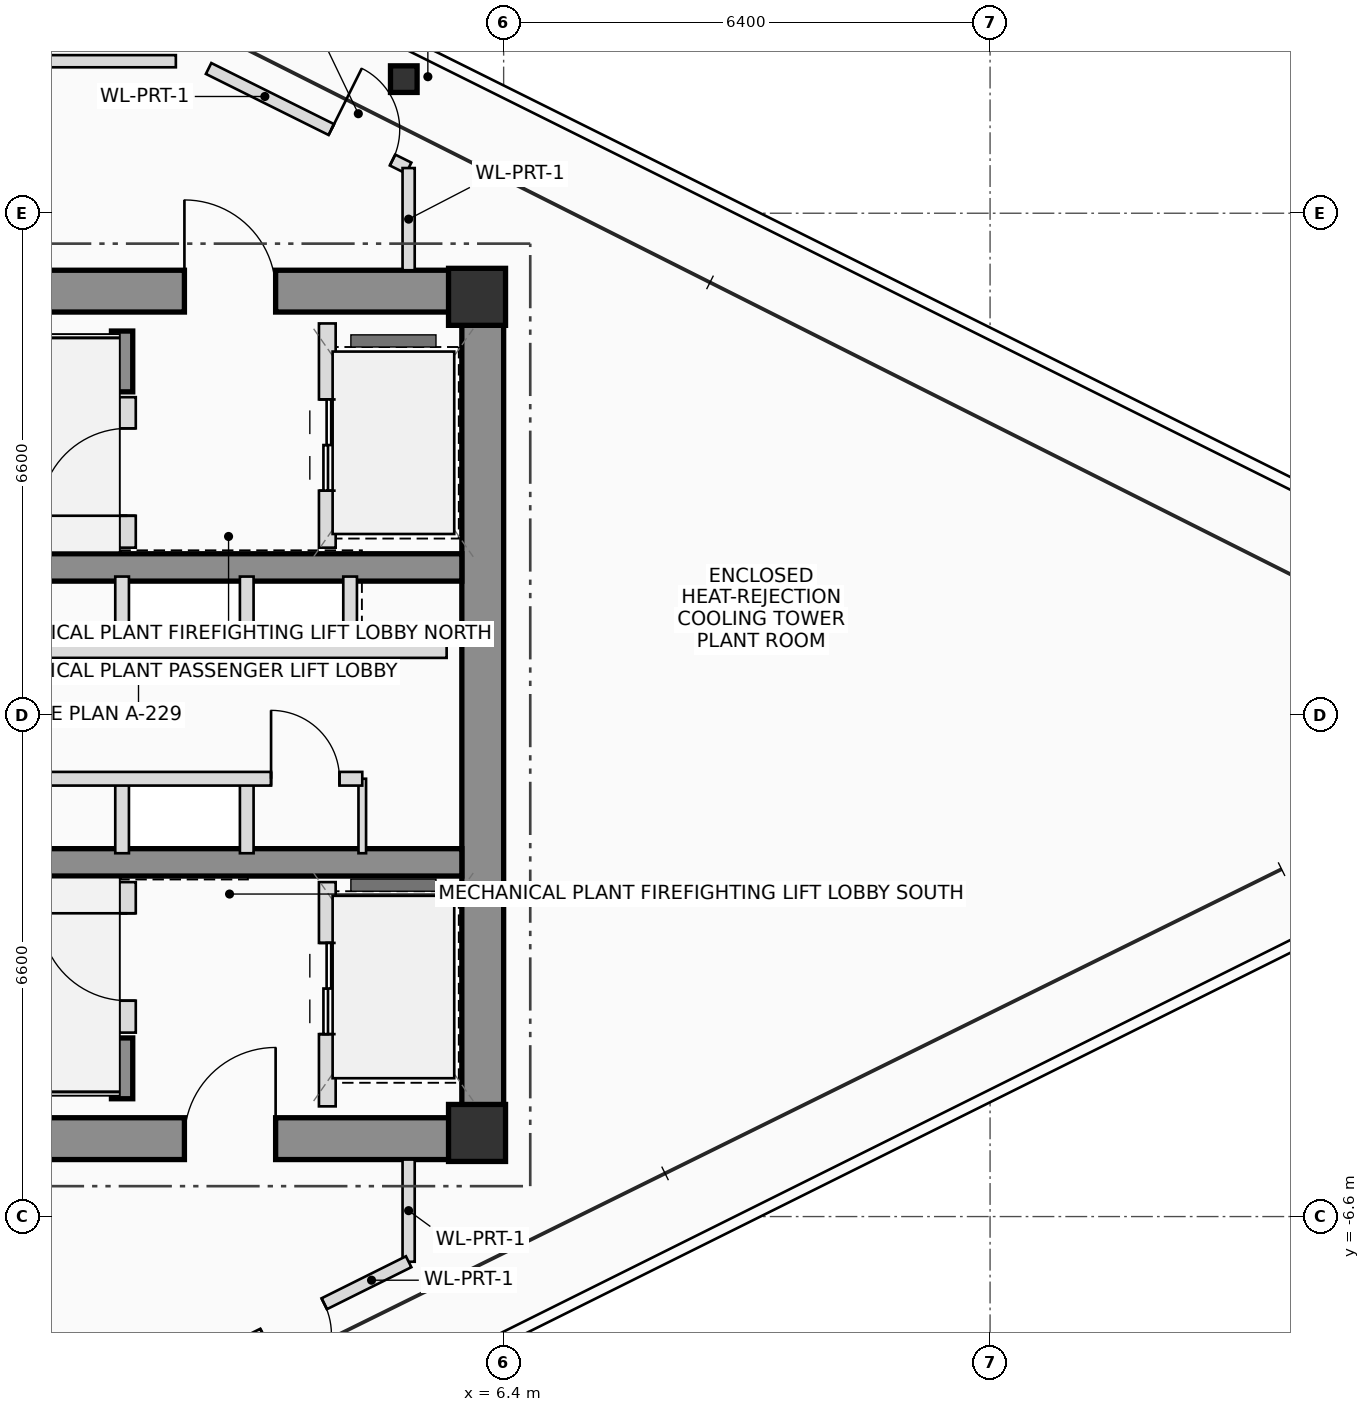
"""IFC4 building model, lengths in metres.
Left out: names, types, materials, properties, quantities, classifications, styles, units other than length and angle.
Written with IfcOpenShell. Run it as: python <this file> out.ifc"""

import sys

from ifc_helpers import new_model, si_unit, direction, frame, frame_2d, origin, origin_2d, place, context, subcontext, project, spatial, rectangle, i_section, extrude, source, transform, mapped, element, fill, save


model = new_model("IFC4")
c1 = context("Model", 3, precision=1e-05, world=origin(), true_north=direction((0.0, 1.0)))
c2 = subcontext(c1, "Body", "Model", "MODEL_VIEW")
j1 = project(units=[si_unit("LENGTHUNIT", "METRE"), si_unit("PLANEANGLEUNIT", "RADIAN")], contexts=[c1])
p1 = place(None, origin())
s1 = spatial("IfcSite", under=j1, at=p1, CompositionType="ELEMENT")
p2 = place(p1, origin())
s2 = spatial("IfcBuilding", under=s1, at=p2, CompositionType="ELEMENT")
p3 = place(p2, frame((0.0, 0.0, 317.45)))
s3 = spatial("IfcBuildingStorey", under=s2, at=p3, CompositionType="ELEMENT", Elevation=317.45)
m1 = source(origin(), c2, "Body", "SweptSolid", [
    extrude(rectangle(XDim=0.75, YDim=0.75, at=origin_2d()), origin(), (0.0, 0.0, 1.0), 5.4),
])
for number, where, z_axis, x_axis in (
    (1, (6.05, -5.5, 0.0), (0.0, 0.0, 1.0), (1.0, 0.0, 0.0)),
    (2, (6.05, 5.5, 0.0), (0.0, 0.0, 1.0), (1.0, 0.0, 0.0)),
):
    element("IfcColumn", number, at=place(p3, frame(where, z_axis=z_axis, x_axis=x_axis)), inside=s3, PredefinedType="COLUMN", context=c2, shape_type="MappedRepresentation", body=[
        mapped(m1, transform((0.0, 0.0, 0.0), scale=1.0)),
    ])
p4 = place(p3, frame((-6.4, 5.575, 0.0), z_axis=(0.0, 0.0, 1.0), x_axis=(1.0, 0.0, 0.0)))
e3 = element("IfcWall", 3, at=p4, inside=s3, PredefinedType="SHEAR", context=c2, shape_type="SweptSolid", body=[
    extrude(rectangle(XDim=12.8, YDim=0.55, at=frame_2d((6.4, 0.0))), origin(), (0.0, 0.0, 1.0), 5.4),
])
p5 = place(p4, frame((8.6, 0.0, 0.0)))
e4 = element("IfcOpeningElement", 4, at=p5, cuts=e3, PredefinedType="OPENING", context=c2, shape_type="SweptSolid", body=[
    extrude(rectangle(XDim=1.2, YDim=2.2, at=frame_2d((0.6, 1.1))), frame((0.0, 0.285, 0.0), z_axis=(0.0, -1.0, 0.0), x_axis=(1.0, 0.0, 0.0)), (0.0, 0.0, 1.0), 0.57),
])
p6 = place(p3, frame((-6.4, -5.575, 0.0), z_axis=(0.0, 0.0, 1.0), x_axis=(1.0, 0.0, 0.0)))
e5 = element("IfcWall", 5, at=p6, inside=s3, PredefinedType="SHEAR", context=c2, shape_type="SweptSolid", body=[
    extrude(rectangle(XDim=12.8, YDim=0.55, at=frame_2d((6.4, 0.0))), origin(), (0.0, 0.0, 1.0), 5.4),
])
p7 = place(p6, frame((8.6, 0.0, 0.0)))
e6 = element("IfcOpeningElement", 6, at=p7, cuts=e5, PredefinedType="OPENING", context=c2, shape_type="SweptSolid", body=[
    extrude(rectangle(XDim=1.2, YDim=2.2, at=frame_2d((0.6, 1.1))), frame((0.0, 0.285, 0.0), z_axis=(0.0, -1.0, 0.0), x_axis=(1.0, 0.0, 0.0)), (0.0, 0.0, 1.0), 0.57),
])
p8 = place(p3, frame((6.125, -5.3, 0.0), z_axis=(0.0, 0.0, 1.0), x_axis=(0.0, 1.0, 0.0)))
e7 = element("IfcWall", 7, at=p8, inside=s3, PredefinedType="SHEAR", context=c2, shape_type="SweptSolid", body=[
    extrude(rectangle(XDim=10.6, YDim=0.55, at=frame_2d((5.3, 0.0))), origin(), (0.0, 0.0, 1.0), 5.4),
])
for number, where, z_axis, x_axis in (
    (8, (-5.85, 1.94, 0.0), (0.0, 0.0, 1.0), (1.0, 0.0, 0.0)),
    (9, (-5.85, -1.94, 0.0), (0.0, 0.0, 1.0), (1.0, 0.0, 0.0)),
):
    element("IfcWall", number, at=place(p3, frame(where, z_axis=z_axis, x_axis=x_axis)), inside=s3, PredefinedType="SHEAR", context=c2, shape_type="SweptSolid", body=[
        extrude(rectangle(XDim=11.7, YDim=0.36, at=frame_2d((5.85, 0.0))), origin(), (0.0, 0.0, 1.0), 5.4),
    ])
for number, where, z_axis, x_axis in (
    (10, (1.38, 4.25, 0.0), (0.0, 0.0, 1.0), (0.0, 1.0, 0.0)),
    (11, (1.38, -5.05, 0.0), (0.0, 0.0, 1.0), (0.0, 1.0, 0.0)),
):
    element("IfcWall", number, at=place(p3, frame(where, z_axis=z_axis, x_axis=x_axis)), inside=s3, PredefinedType="SHEAR", context=c2, shape_type="SweptSolid", body=[
        extrude(rectangle(XDim=0.8, YDim=0.28, at=frame_2d((0.4, 0.0))), origin(), (0.0, 0.0, 1.0), 5.4),
    ])
m2 = source(origin(), c2, "Body", "SweptSolid", [
    extrude(i_section(OverallWidth=0.35, OverallDepth=0.35, WebThickness=0.012, FlangeThickness=0.019, FilletRadius=0.016, at=origin_2d()), origin(), (0.0, 0.0, 1.0), 5.4),
])
p9 = place(p3, frame((5.086, 8.364, 0.0), z_axis=(0.0, 0.0, 1.0), x_axis=(1.0, 0.0, 0.0)))
e12 = element("IfcColumn", 12, at=p9, inside=s3, PredefinedType="COLUMN", context=c2, shape_type="MappedRepresentation", body=[
    mapped(m2, transform((0.0, 0.0, 0.0), scale=1.0)),
])
p10 = place(p3, frame((1.45, 2.2, 0.0), z_axis=(0.0, 0.0, 1.0), x_axis=(0.0, 1.0, 0.0)))
e13 = element("IfcWall", 13, at=p10, inside=s3, PredefinedType="PLUMBINGWALL", context=c2, shape_type="SweptSolid", body=[
    extrude(rectangle(XDim=1.98, YDim=0.22, at=frame_2d((0.99, 0.0))), origin(), (0.0, 0.0, 1.0), 5.12),
])
p11 = place(p10, frame((0.42, 0.0, 0.0)))
e14 = element("IfcOpeningElement", 14, at=p11, cuts=e13, PredefinedType="OPENING", context=c2, shape_type="SweptSolid", body=[
    extrude(rectangle(XDim=1.15, YDim=2.15, at=frame_2d((0.575, 1.075))), frame((0.0, 0.12, 0.0), z_axis=(0.0, -1.0, 0.0), x_axis=(1.0, 0.0, 0.0)), (0.0, 0.0, 1.0), 0.24),
])
p12 = place(p3, frame((4.08, 2.2, 0.0), z_axis=(0.0, 0.0, 1.0), x_axis=(0.0, 1.0, 0.0)))
e15 = element("IfcWall", 15, at=p12, inside=s3, PredefinedType="PLUMBINGWALL", context=c2, shape_type="SweptSolid", body=[
    extrude(rectangle(XDim=2.95, YDim=0.22, at=frame_2d((1.475, 0.0))), origin(), (0.0, 0.0, 1.0), 5.12),
])
p13 = place(p12, frame((0.75, 0.0, 0.0)))
e16 = element("IfcOpeningElement", 16, at=p13, cuts=e15, PredefinedType="OPENING", context=c2, shape_type="SweptSolid", body=[
    extrude(rectangle(XDim=1.2, YDim=2.25, at=frame_2d((0.6, 1.125))), frame((0.0, 0.12, 0.0), z_axis=(0.0, -1.0, 0.0), x_axis=(1.0, 0.0, 0.0)), (0.0, 0.0, 1.0), 0.24),
])
p14 = place(p3, frame((1.45, -4.18, 0.0), z_axis=(0.0, 0.0, 1.0), x_axis=(0.0, 1.0, 0.0)))
e17 = element("IfcWall", 17, at=p14, inside=s3, PredefinedType="PLUMBINGWALL", context=c2, shape_type="SweptSolid", body=[
    extrude(rectangle(XDim=1.98, YDim=0.22, at=frame_2d((0.99, 0.0))), origin(), (0.0, 0.0, 1.0), 5.12),
])
p15 = place(p14, frame((0.42, 0.0, 0.0)))
e18 = element("IfcOpeningElement", 18, at=p15, cuts=e17, PredefinedType="OPENING", context=c2, shape_type="SweptSolid", body=[
    extrude(rectangle(XDim=1.15, YDim=2.15, at=frame_2d((0.575, 1.075))), frame((0.0, 0.12, 0.0), z_axis=(0.0, -1.0, 0.0), x_axis=(1.0, 0.0, 0.0)), (0.0, 0.0, 1.0), 0.24),
])
p16 = place(p3, frame((4.08, -5.15, 0.0), z_axis=(0.0, 0.0, 1.0), x_axis=(0.0, 1.0, 0.0)))
e19 = element("IfcWall", 19, at=p16, inside=s3, PredefinedType="PLUMBINGWALL", context=c2, shape_type="SweptSolid", body=[
    extrude(rectangle(XDim=2.95, YDim=0.22, at=frame_2d((1.475, 0.0))), origin(), (0.0, 0.0, 1.0), 5.12),
])
p17 = place(p16, frame((0.95, 0.0, 0.0)))
e20 = element("IfcOpeningElement", 20, at=p17, cuts=e19, PredefinedType="OPENING", context=c2, shape_type="SweptSolid", body=[
    extrude(rectangle(XDim=1.2, YDim=2.25, at=frame_2d((0.6, 1.125))), frame((0.0, 0.12, 0.0), z_axis=(0.0, -1.0, 0.0), x_axis=(1.0, 0.0, 0.0)), (0.0, 0.0, 1.0), 0.24),
])
for number, where, z_axis, x_axis in (
    (21, (1.38, 0.84, 0.0), (0.0, 0.0, 1.0), (0.0, 1.0, 0.0)),
    (22, (1.38, -1.82, 0.0), (0.0, 0.0, 1.0), (0.0, 1.0, 0.0)),
    (23, (3.02, 0.84, 0.0), (0.0, 0.0, 1.0), (0.0, 1.0, 0.0)),
    (24, (4.38, 0.84, 0.0), (0.0, 0.0, 1.0), (0.0, 1.0, 0.0)),
    (25, (3.02, -1.82, 0.0), (0.0, 0.0, 1.0), (0.0, 1.0, 0.0)),
):
    element("IfcWall", number, at=place(p3, frame(where, z_axis=z_axis, x_axis=x_axis)), inside=s3, PredefinedType="PLUMBINGWALL", context=c2, shape_type="SweptSolid", body=[
        extrude(rectangle(XDim=0.98, YDim=0.18, at=frame_2d((0.49, 0.0))), origin(), (0.0, 0.0, 1.0), 5.12),
    ])
p18 = place(p3, frame((4.54, -1.82, 0.0), z_axis=(0.0, 0.0, 1.0), x_axis=(0.0, 1.0, 0.0)))
e26 = element("IfcWall", 26, at=p18, inside=s3, PredefinedType="PARTITIONING", context=c2, shape_type="SweptSolid", body=[
    extrude(rectangle(XDim=0.98, YDim=0.1, at=frame_2d((0.49, 0.0))), origin(), (0.0, 0.0, 1.0), 5.12),
])
p19 = place(p3, frame((-5.68, 0.84, 0.0), z_axis=(0.0, 0.0, 1.0), x_axis=(1.0, 0.0, 0.0)))
e27 = element("IfcWall", 27, at=p19, inside=s3, PredefinedType="PLUMBINGWALL", context=c2, shape_type="SweptSolid", body=[
    extrude(rectangle(XDim=11.33, YDim=0.18, at=frame_2d((5.665, 0.0))), origin(), (0.0, 0.0, 1.0), 5.12),
])
p20 = place(p19, frame((3.13, 0.0, 0.0)))
e28 = element("IfcOpeningElement", 28, at=p20, cuts=e27, PredefinedType="OPENING", context=c2, shape_type="SweptSolid", body=[
    extrude(rectangle(XDim=0.9, YDim=2.05, at=frame_2d((0.45, 1.025))), frame((0.0, 0.1, 0.0), z_axis=(0.0, -1.0, 0.0), x_axis=(1.0, 0.0, 0.0)), (0.0, 0.0, 1.0), 0.2),
])
p21 = place(p3, frame((-5.68, -0.84, 0.0), z_axis=(0.0, 0.0, 1.0), x_axis=(1.0, 0.0, 0.0)))
e29 = element("IfcWall", 29, at=p21, inside=s3, PredefinedType="PLUMBINGWALL", context=c2, shape_type="SweptSolid", body=[
    extrude(rectangle(XDim=10.22, YDim=0.18, at=frame_2d((5.11, 0.0))), origin(), (0.0, 0.0, 1.0), 5.12),
])
p22 = place(p21, frame((3.13, 0.0, 0.0)))
e30 = element("IfcOpeningElement", 30, at=p22, cuts=e29, PredefinedType="OPENING", context=c2, shape_type="SweptSolid", body=[
    extrude(rectangle(XDim=0.9, YDim=2.05, at=frame_2d((0.45, 1.025))), frame((0.0, 0.1, 0.0), z_axis=(0.0, -1.0, 0.0), x_axis=(1.0, 0.0, 0.0)), (0.0, 0.0, 1.0), 0.2),
])
p23 = place(p21, frame((9.02, 0.0, 0.0)))
e31 = element("IfcOpeningElement", 31, at=p23, cuts=e29, PredefinedType="OPENING", context=c2, shape_type="SweptSolid", body=[
    extrude(rectangle(XDim=0.9, YDim=2.05, at=frame_2d((0.45, 1.025))), frame((0.0, 0.1, 0.0), z_axis=(0.0, -1.0, 0.0), x_axis=(1.0, 0.0, 0.0)), (0.0, 0.0, 1.0), 0.2),
])
p24 = place(p3, frame((-9.15, 8.6, 0.0), z_axis=(0.0, 0.0, 1.0), x_axis=(1.0, 0.0, 0.0)))
e32 = element("IfcWall", 32, at=p24, inside=s3, PredefinedType="PARTITIONING", context=c2, shape_type="SweptSolid", body=[
    extrude(rectangle(XDim=11.237, YDim=0.16, at=frame_2d((5.619, 0.0))), origin(), (0.0, 0.0, 1.0), 5.12),
])
p25 = place(p3, frame((2.518, 8.504, 0.0), z_axis=(0.0, 0.0, 1.0), x_axis=(0.895206507412, -0.445651555689, 0.0)))
e33 = element("IfcWall", 33, at=p25, inside=s3, PredefinedType="PARTITIONING", context=c2, shape_type="SweptSolid", body=[
    extrude(rectangle(XDim=2.94, YDim=0.16, at=frame_2d((1.47, 0.0))), origin(), (0.0, 0.0, 1.0), 5.12),
])
p26 = place(p25, frame((1.804, 0.0, 0.0)))
e34 = element("IfcOpeningElement", 34, at=p26, cuts=e33, PredefinedType="OPENING", context=c2, shape_type="SweptSolid", body=[
    extrude(rectangle(XDim=0.9, YDim=2.05, at=frame_2d((0.45, 1.025))), frame((0.0, 0.09, 0.0), z_axis=(0.0, -1.0, 0.0), x_axis=(1.0, 0.0, 0.0)), (0.0, 0.0, 1.0), 0.18),
])
for number, where, z_axis, x_axis in (
    (35, (5.15, 7.194, 0.0), (0.0, 0.0, 1.0), (0.0, -1.0, 0.0)),
    (36, (5.15, -5.85, 0.0), (0.0, 0.0, 1.0), (0.0, -1.0, 0.0)),
):
    element("IfcWall", number, at=place(p3, frame(where, z_axis=z_axis, x_axis=x_axis)), inside=s3, PredefinedType="PARTITIONING", context=c2, shape_type="SweptSolid", body=[
        extrude(rectangle(XDim=1.344, YDim=0.16, at=frame_2d((0.672, 0.0))), origin(), (0.0, 0.0, 1.0), 5.12),
    ])
p27 = place(p3, frame((5.15, -7.194, 0.0), z_axis=(0.0, 0.0, 1.0), x_axis=(-0.895230583317, -0.445603189725, 0.0)))
e37 = element("IfcWall", 37, at=p27, inside=s3, PredefinedType="PARTITIONING", context=c2, shape_type="SweptSolid", body=[
    extrude(rectangle(XDim=3.155, YDim=0.16, at=frame_2d((1.577, 0.0))), origin(), (0.0, 0.0, 1.0), 5.12),
])
p28 = place(p27, frame((1.24, 0.0, 0.0)))
e38 = element("IfcOpeningElement", 38, at=p28, cuts=e37, PredefinedType="OPENING", context=c2, shape_type="SweptSolid", body=[
    extrude(rectangle(XDim=0.9, YDim=2.05, at=frame_2d((0.45, 1.025))), frame((0.0, 0.09, 0.0), z_axis=(0.0, -1.0, 0.0), x_axis=(1.0, 0.0, 0.0)), (0.0, 0.0, 1.0), 0.18),
])
p29 = place(p5, origin())
e39 = element("IfcDoor", 39, at=p29, inside=s3, OperationType="SINGLE_SWING_LEFT", PredefinedType="DOOR", context=c2, shape_type="SweptSolid", body=[
    extrude(rectangle(XDim=1.2, YDim=2.2, at=frame_2d((0.6, 1.1))), frame((0.0, 0.025, 0.0), z_axis=(0.0, -1.0, 0.0), x_axis=(1.0, 0.0, 0.0)), (0.0, 0.0, 1.0), 0.05),
])
fill(e4, e39)
p30 = place(p7, origin())
e40 = element("IfcDoor", 40, at=p30, inside=s3, OperationType="SINGLE_SWING_RIGHT", PredefinedType="DOOR", context=c2, shape_type="SweptSolid", body=[
    extrude(rectangle(XDim=1.2, YDim=2.2, at=frame_2d((0.6, 1.1))), frame((0.0, 0.025, 0.0), z_axis=(0.0, -1.0, 0.0), x_axis=(1.0, 0.0, 0.0)), (0.0, 0.0, 1.0), 0.05),
])
fill(e6, e40)
p31 = place(p11, origin())
e41 = element("IfcDoor", 41, at=p31, inside=s3, OperationType="SINGLE_SWING_LEFT", PredefinedType="DOOR", context=c2, shape_type="SweptSolid", body=[
    extrude(rectangle(XDim=1.15, YDim=2.15, at=frame_2d((0.575, 1.075))), frame((0.0, 0.025, 0.0), z_axis=(0.0, -1.0, 0.0), x_axis=(1.0, 0.0, 0.0)), (0.0, 0.0, 1.0), 0.05),
])
fill(e14, e41)
p32 = place(p13, origin())
e42 = element("IfcDoor", 42, at=p32, inside=s3, OperationType="DOUBLE_DOOR_SLIDING", PredefinedType="DOOR", context=c2, shape_type="SweptSolid", body=[
    extrude(rectangle(XDim=1.2, YDim=2.25, at=frame_2d((0.6, 1.125))), frame((0.0, 0.025, 0.0), z_axis=(0.0, -1.0, 0.0), x_axis=(1.0, 0.0, 0.0)), (0.0, 0.0, 1.0), 0.05),
])
fill(e16, e42)
p33 = place(p15, origin())
e43 = element("IfcDoor", 43, at=p33, inside=s3, OperationType="SINGLE_SWING_RIGHT", PredefinedType="DOOR", context=c2, shape_type="SweptSolid", body=[
    extrude(rectangle(XDim=1.15, YDim=2.15, at=frame_2d((0.575, 1.075))), frame((0.0, 0.025, 0.0), z_axis=(0.0, -1.0, 0.0), x_axis=(1.0, 0.0, 0.0)), (0.0, 0.0, 1.0), 0.05),
])
fill(e18, e43)
p34 = place(p17, origin())
e44 = element("IfcDoor", 44, at=p34, inside=s3, OperationType="DOUBLE_DOOR_SLIDING", PredefinedType="DOOR", context=c2, shape_type="SweptSolid", body=[
    extrude(rectangle(XDim=1.2, YDim=2.25, at=frame_2d((0.6, 1.125))), frame((0.0, 0.025, 0.0), z_axis=(0.0, -1.0, 0.0), x_axis=(1.0, 0.0, 0.0)), (0.0, 0.0, 1.0), 0.05),
])
fill(e20, e44)
p35 = place(p23, origin())
e45 = element("IfcDoor", 45, at=p35, inside=s3, OperationType="SINGLE_SWING_LEFT", PredefinedType="DOOR", context=c2, shape_type="SweptSolid", body=[
    extrude(rectangle(XDim=0.9, YDim=2.05, at=frame_2d((0.45, 1.025))), frame((0.0, 0.025, 0.0), z_axis=(0.0, -1.0, 0.0), x_axis=(1.0, 0.0, 0.0)), (0.0, 0.0, 1.0), 0.05),
])
fill(e31, e45)
p36 = place(p26, origin())
e46 = element("IfcDoor", 46, at=p36, inside=s3, OperationType="SINGLE_SWING_LEFT", PredefinedType="DOOR", context=c2, shape_type="SweptSolid", body=[
    extrude(rectangle(XDim=0.9, YDim=2.05, at=frame_2d((0.45, 1.025))), frame((0.0, 0.025, 0.0), z_axis=(0.0, -1.0, 0.0), x_axis=(1.0, 0.0, 0.0)), (0.0, 0.0, 1.0), 0.05),
])
fill(e34, e46)
p37 = place(p28, origin())
e47 = element("IfcDoor", 47, at=p37, inside=s3, OperationType="SINGLE_SWING_RIGHT", PredefinedType="DOOR", context=c2, shape_type="SweptSolid", body=[
    extrude(rectangle(XDim=0.9, YDim=2.05, at=frame_2d((0.45, 1.025))), frame((0.0, 0.025, 0.0), z_axis=(0.0, -1.0, 0.0), x_axis=(1.0, 0.0, 0.0)), (0.0, 0.0, 1.0), 0.05),
])
fill(e38, e47)
save(model, sys.argv[1])
